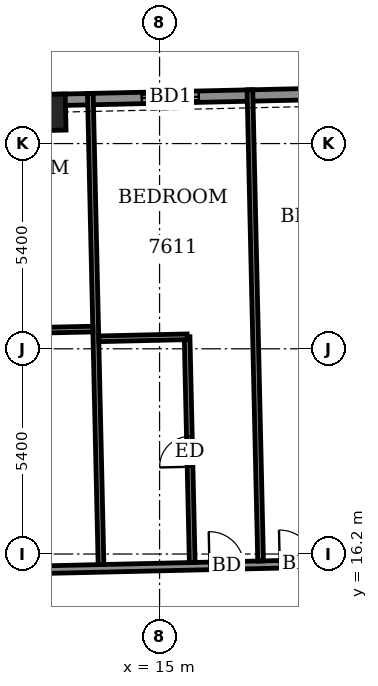
"""IFC4 building model, lengths in metres.
Left out: names, types, materials, properties, quantities, classifications, styles, units other than length and angle.
Written with IfcOpenShell. Run it as: python <this file> out.ifc"""

import sys

from ifc_helpers import new_model, si_unit, direction, frame, frame_2d, origin, origin_2d, place, context, subcontext, project, spatial, rectangle, extrude, element, fill, save


model = new_model("IFC4")
c1 = context("Model", 3, precision=1e-05, world=origin(), true_north=direction((0.0, 1.0)))
c2 = subcontext(c1, "Body", "Model", "MODEL_VIEW")
j1 = project(units=[si_unit("LENGTHUNIT", "METRE"), si_unit("PLANEANGLEUNIT", "RADIAN")], contexts=[c1])
p1 = place(None, origin())
s1 = spatial("IfcSite", under=j1, at=p1, CompositionType="ELEMENT")
p2 = place(p1, origin())
s2 = spatial("IfcBuilding", under=s1, at=p2, CompositionType="ELEMENT")
p3 = place(p2, frame((0.0, 0.0, 297.9)))
s3 = spatial("IfcBuildingStorey", under=s2, at=p3, CompositionType="ELEMENT", Elevation=297.9)
p4 = place(p3, frame((12.053, 27.819, -0.55), z_axis=(0.0, 0.0, 1.0), x_axis=(-0.9997425919, -0.02268810132, 0.0)))
e1 = element("IfcColumn", 1, at=p4, inside=s3, PredefinedType="COLUMN", context=c2, shape_type="SweptSolid", body=[
    extrude(rectangle(XDim=0.95, YDim=0.95, at=origin_2d()), origin(), (0.0, 0.0, 1.0), 3.6),
])
p5 = place(p3, frame((26.216, 28.465, 0.0), z_axis=(0.0, 0.0, 1.0), x_axis=(-0.999742843677, -0.022677004157, 0.0)))
e2 = element("IfcWall", 2, at=p5, inside=s3, PredefinedType="SOLIDWALL", context=c2, shape_type="SweptSolid", body=[
    extrude(rectangle(XDim=49.836, YDim=0.3, at=frame_2d((24.918, 0.0))), origin(), (0.0, 0.0, 1.0), 2.5),
])
p6 = place(p5, frame((1.763, 0.0, 0.0)))
e3 = element("IfcOpeningElement", 3, at=p6, cuts=e2, PredefinedType="OPENING", context=c2, shape_type="SweptSolid", body=[
    extrude(rectangle(XDim=1.5, YDim=2.4, at=frame_2d((0.75, 1.2))), frame((0.0, 0.16, 0.0), z_axis=(0.0, -1.0, 0.0), x_axis=(1.0, 0.0, 0.0)), (0.0, 0.0, 1.0), 0.32),
])
p7 = place(p5, frame((4.912, 0.0, 0.0)))
e4 = element("IfcOpeningElement", 4, at=p7, cuts=e2, PredefinedType="OPENING", context=c2, shape_type="SweptSolid", body=[
    extrude(rectangle(XDim=1.5, YDim=2.4, at=frame_2d((0.75, 1.2))), frame((0.0, 0.16, 0.0), z_axis=(0.0, -1.0, 0.0), x_axis=(1.0, 0.0, 0.0)), (0.0, 0.0, 1.0), 0.32),
])
p8 = place(p5, frame((10.186, 0.0, 0.0)))
e5 = element("IfcOpeningElement", 5, at=p8, cuts=e2, PredefinedType="OPENING", context=c2, shape_type="SweptSolid", body=[
    extrude(rectangle(XDim=1.5, YDim=2.4, at=frame_2d((0.75, 1.2))), frame((0.0, 0.16, 0.0), z_axis=(0.0, -1.0, 0.0), x_axis=(1.0, 0.0, 0.0)), (0.0, 0.0, 1.0), 0.32),
])
p9 = place(p5, frame((15.093, 0.0, 0.0)))
e6 = element("IfcOpeningElement", 6, at=p9, cuts=e2, PredefinedType="OPENING", context=c2, shape_type="SweptSolid", body=[
    extrude(rectangle(XDim=1.5, YDim=2.4, at=frame_2d((0.75, 1.2))), frame((0.0, 0.16, 0.0), z_axis=(0.0, -1.0, 0.0), x_axis=(1.0, 0.0, 0.0)), (0.0, 0.0, 1.0), 0.32),
])
p10 = place(p5, frame((18.449, 0.0, 0.0)))
e7 = element("IfcOpeningElement", 7, at=p10, cuts=e2, PredefinedType="OPENING", context=c2, shape_type="SweptSolid", body=[
    extrude(rectangle(XDim=1.5, YDim=2.4, at=frame_2d((0.75, 1.2))), frame((0.0, 0.16, 0.0), z_axis=(0.0, -1.0, 0.0), x_axis=(1.0, 0.0, 0.0)), (0.0, 0.0, 1.0), 0.32),
])
p11 = place(p5, frame((22.924, 0.0, 0.0)))
e8 = element("IfcOpeningElement", 8, at=p11, cuts=e2, PredefinedType="OPENING", context=c2, shape_type="SweptSolid", body=[
    extrude(rectangle(XDim=1.5, YDim=2.4, at=frame_2d((0.75, 1.2))), frame((0.0, 0.16, 0.0), z_axis=(0.0, -1.0, 0.0), x_axis=(1.0, 0.0, 0.0)), (0.0, 0.0, 1.0), 0.32),
])
p12 = place(p5, frame((26.28, 0.0, 0.0)))
e9 = element("IfcOpeningElement", 9, at=p12, cuts=e2, PredefinedType="OPENING", context=c2, shape_type="SweptSolid", body=[
    extrude(rectangle(XDim=1.5, YDim=2.4, at=frame_2d((0.75, 1.2))), frame((0.0, 0.16, 0.0), z_axis=(0.0, -1.0, 0.0), x_axis=(1.0, 0.0, 0.0)), (0.0, 0.0, 1.0), 0.32),
])
p13 = place(p5, frame((31.361, 0.0, 0.0)))
e10 = element("IfcOpeningElement", 10, at=p13, cuts=e2, PredefinedType="OPENING", context=c2, shape_type="SweptSolid", body=[
    extrude(rectangle(XDim=1.5, YDim=2.4, at=frame_2d((0.75, 1.2))), frame((0.0, 0.16, 0.0), z_axis=(0.0, -1.0, 0.0), x_axis=(1.0, 0.0, 0.0)), (0.0, 0.0, 1.0), 0.32),
])
p14 = place(p5, frame((36.437, 0.0, 0.0)))
e11 = element("IfcOpeningElement", 11, at=p14, cuts=e2, PredefinedType="OPENING", context=c2, shape_type="SweptSolid", body=[
    extrude(rectangle(XDim=1.5, YDim=2.4, at=frame_2d((0.75, 1.2))), frame((0.0, 0.16, 0.0), z_axis=(0.0, -1.0, 0.0), x_axis=(1.0, 0.0, 0.0)), (0.0, 0.0, 1.0), 0.32),
])
p15 = place(p5, frame((39.793, 0.0, 0.0)))
e12 = element("IfcOpeningElement", 12, at=p15, cuts=e2, PredefinedType="OPENING", context=c2, shape_type="SweptSolid", body=[
    extrude(rectangle(XDim=1.5, YDim=2.4, at=frame_2d((0.75, 1.2))), frame((0.0, 0.16, 0.0), z_axis=(0.0, -1.0, 0.0), x_axis=(1.0, 0.0, 0.0)), (0.0, 0.0, 1.0), 0.32),
])
p16 = place(p5, frame((44.267, 0.0, 0.0)))
e13 = element("IfcOpeningElement", 13, at=p16, cuts=e2, PredefinedType="OPENING", context=c2, shape_type="SweptSolid", body=[
    extrude(rectangle(XDim=1.5, YDim=2.4, at=frame_2d((0.75, 1.2))), frame((0.0, 0.16, 0.0), z_axis=(0.0, -1.0, 0.0), x_axis=(1.0, 0.0, 0.0)), (0.0, 0.0, 1.0), 0.32),
])
p17 = place(p5, frame((47.524, 0.0, 0.9)))
e14 = element("IfcOpeningElement", 14, at=p17, cuts=e2, PredefinedType="OPENING", context=c2, shape_type="SweptSolid", body=[
    extrude(rectangle(XDim=1.2, YDim=1.5, at=frame_2d((0.6, 0.75))), frame((0.0, 0.16, 0.0), z_axis=(0.0, -1.0, 0.0), x_axis=(1.0, 0.0, 0.0)), (0.0, 0.0, 1.0), 0.32),
])
p18 = place(p3, frame((-26.401, 14.918, 0.0), z_axis=(0.0, 0.0, 1.0), x_axis=(0.99974239733, 0.022696673341, 0.0)))
e15 = element("IfcWall", 15, at=p18, inside=s3, PredefinedType="PARTITIONING", context=c2, shape_type="SweptSolid", body=[
    extrude(rectangle(XDim=55.386, YDim=0.2, at=frame_2d((27.693, 0.0))), origin(), (0.0, 0.0, 1.0), 3.05),
])
p19 = place(p18, frame((53.718, 0.0, 0.0)))
e16 = element("IfcOpeningElement", 16, at=p19, cuts=e15, PredefinedType="OPENING", context=c2, shape_type="SweptSolid", body=[
    extrude(rectangle(XDim=1.0, YDim=2.1, at=frame_2d((0.5, 1.05))), frame((0.0, 0.11, 0.0), z_axis=(0.0, -1.0, 0.0), x_axis=(1.0, 0.0, 0.0)), (0.0, 0.0, 1.0), 0.22),
])
p20 = place(p18, frame((49.325, 0.0, 0.0)))
e17 = element("IfcOpeningElement", 17, at=p20, cuts=e15, PredefinedType="OPENING", context=c2, shape_type="SweptSolid", body=[
    extrude(rectangle(XDim=0.9, YDim=2.1, at=frame_2d((0.45, 1.05))), frame((0.0, 0.11, 0.0), z_axis=(0.0, -1.0, 0.0), x_axis=(1.0, 0.0, 0.0)), (0.0, 0.0, 1.0), 0.22),
])
p21 = place(p18, frame((44.575, 0.0, 0.0)))
e18 = element("IfcOpeningElement", 18, at=p21, cuts=e15, PredefinedType="OPENING", context=c2, shape_type="SweptSolid", body=[
    extrude(rectangle(XDim=0.9, YDim=2.1, at=frame_2d((0.45, 1.05))), frame((0.0, 0.11, 0.0), z_axis=(0.0, -1.0, 0.0), x_axis=(1.0, 0.0, 0.0)), (0.0, 0.0, 1.0), 0.22),
])
p22 = place(p18, frame((42.725, 0.0, 0.0)))
e19 = element("IfcOpeningElement", 19, at=p22, cuts=e15, PredefinedType="OPENING", context=c2, shape_type="SweptSolid", body=[
    extrude(rectangle(XDim=0.9, YDim=2.1, at=frame_2d((0.45, 1.05))), frame((0.0, 0.11, 0.0), z_axis=(0.0, -1.0, 0.0), x_axis=(1.0, 0.0, 0.0)), (0.0, 0.0, 1.0), 0.22),
])
p23 = place(p18, frame((36.1, 0.0, 0.0)))
e20 = element("IfcOpeningElement", 20, at=p23, cuts=e15, PredefinedType="OPENING", context=c2, shape_type="SweptSolid", body=[
    extrude(rectangle(XDim=0.9, YDim=2.1, at=frame_2d((0.45, 1.05))), frame((0.0, 0.11, 0.0), z_axis=(0.0, -1.0, 0.0), x_axis=(1.0, 0.0, 0.0)), (0.0, 0.0, 1.0), 0.22),
])
p24 = place(p18, frame((34.25, 0.0, 0.0)))
e21 = element("IfcOpeningElement", 21, at=p24, cuts=e15, PredefinedType="OPENING", context=c2, shape_type="SweptSolid", body=[
    extrude(rectangle(XDim=0.9, YDim=2.1, at=frame_2d((0.45, 1.05))), frame((0.0, 0.11, 0.0), z_axis=(0.0, -1.0, 0.0), x_axis=(1.0, 0.0, 0.0)), (0.0, 0.0, 1.0), 0.22),
])
p25 = place(p18, frame((27.6, 0.0, 0.0)))
e22 = element("IfcOpeningElement", 22, at=p25, cuts=e15, PredefinedType="OPENING", context=c2, shape_type="SweptSolid", body=[
    extrude(rectangle(XDim=0.9, YDim=2.1, at=frame_2d((0.45, 1.05))), frame((0.0, 0.11, 0.0), z_axis=(0.0, -1.0, 0.0), x_axis=(1.0, 0.0, 0.0)), (0.0, 0.0, 1.0), 0.22),
])
p26 = place(p18, frame((25.775, 0.0, 0.0)))
e23 = element("IfcOpeningElement", 23, at=p26, cuts=e15, PredefinedType="OPENING", context=c2, shape_type="SweptSolid", body=[
    extrude(rectangle(XDim=0.9, YDim=2.1, at=frame_2d((0.45, 1.05))), frame((0.0, 0.11, 0.0), z_axis=(0.0, -1.0, 0.0), x_axis=(1.0, 0.0, 0.0)), (0.0, 0.0, 1.0), 0.22),
])
p27 = place(p18, frame((19.15, 0.0, 0.0)))
e24 = element("IfcOpeningElement", 24, at=p27, cuts=e15, PredefinedType="OPENING", context=c2, shape_type="SweptSolid", body=[
    extrude(rectangle(XDim=0.9, YDim=2.1, at=frame_2d((0.45, 1.05))), frame((0.0, 0.11, 0.0), z_axis=(0.0, -1.0, 0.0), x_axis=(1.0, 0.0, 0.0)), (0.0, 0.0, 1.0), 0.22),
])
p28 = place(p18, frame((17.3, 0.0, 0.0)))
e25 = element("IfcOpeningElement", 25, at=p28, cuts=e15, PredefinedType="OPENING", context=c2, shape_type="SweptSolid", body=[
    extrude(rectangle(XDim=0.9, YDim=2.1, at=frame_2d((0.45, 1.05))), frame((0.0, 0.11, 0.0), z_axis=(0.0, -1.0, 0.0), x_axis=(1.0, 0.0, 0.0)), (0.0, 0.0, 1.0), 0.22),
])
p29 = place(p18, frame((10.65, 0.0, 0.0)))
e26 = element("IfcOpeningElement", 26, at=p29, cuts=e15, PredefinedType="OPENING", context=c2, shape_type="SweptSolid", body=[
    extrude(rectangle(XDim=0.9, YDim=2.1, at=frame_2d((0.45, 1.05))), frame((0.0, 0.11, 0.0), z_axis=(0.0, -1.0, 0.0), x_axis=(1.0, 0.0, 0.0)), (0.0, 0.0, 1.0), 0.22),
])
p30 = place(p18, frame((8.8, 0.0, 0.0)))
e27 = element("IfcOpeningElement", 27, at=p30, cuts=e15, PredefinedType="OPENING", context=c2, shape_type="SweptSolid", body=[
    extrude(rectangle(XDim=0.9, YDim=2.1, at=frame_2d((0.45, 1.05))), frame((0.0, 0.11, 0.0), z_axis=(0.0, -1.0, 0.0), x_axis=(1.0, 0.0, 0.0)), (0.0, 0.0, 1.0), 0.22),
])
p31 = place(p18, frame((1.864, 0.0, 0.0)))
e28 = element("IfcOpeningElement", 28, at=p31, cuts=e15, PredefinedType="OPENING", context=c2, shape_type="SweptSolid", body=[
    extrude(rectangle(XDim=1.0, YDim=2.1, at=frame_2d((0.5, 1.05))), frame((0.0, 0.11, 0.0), z_axis=(0.0, -1.0, 0.0), x_axis=(1.0, 0.0, 0.0)), (0.0, 0.0, 1.0), 0.22),
])
p32 = place(p3, frame((13.459, 15.923, 0.0), z_axis=(0.0, 0.0, 1.0), x_axis=(-0.022661475803, 0.999743195783, 0.0)))
e29 = element("IfcWall", 29, at=p32, inside=s3, PredefinedType="PARTITIONING", context=c2, shape_type="SweptSolid", body=[
    extrude(rectangle(XDim=12.4, YDim=0.15, at=frame_2d((6.2, 0.0))), origin(), (0.0, 0.0, 1.0), 2.5),
])
p33 = place(p3, frame((15.859, 15.977, 0.0), z_axis=(0.0, 0.0, 1.0), x_axis=(-0.022685930195, 0.999742641169, 0.0)))
e30 = element("IfcWall", 30, at=p33, inside=s3, PredefinedType="PARTITIONING", context=c2, shape_type="SweptSolid", body=[
    extrude(rectangle(XDim=5.94, YDim=0.15, at=frame_2d((2.97, 0.0))), origin(), (0.0, 0.0, 1.0), 3.05),
])
p34 = place(p33, frame((2.52, 0.0, 0.0)))
e31 = element("IfcOpeningElement", 31, at=p34, cuts=e30, PredefinedType="OPENING", context=c2, shape_type="SweptSolid", body=[
    extrude(rectangle(XDim=0.8, YDim=2.1, at=frame_2d((0.4, 1.05))), frame((0.0, 0.085, 0.0), z_axis=(0.0, -1.0, 0.0), x_axis=(1.0, 0.0, 0.0)), (0.0, 0.0, 1.0), 0.17),
])
p35 = place(p3, frame((17.658, 16.018, 0.0), z_axis=(0.0, 0.0, 1.0), x_axis=(-0.022661475803, 0.999743195783, 0.0)))
e32 = element("IfcWall", 32, at=p35, inside=s3, PredefinedType="PARTITIONING", context=c2, shape_type="SweptSolid", body=[
    extrude(rectangle(XDim=12.4, YDim=0.15, at=frame_2d((6.2, 0.0))), origin(), (0.0, 0.0, 1.0), 2.5),
])
for number, where, z_axis, x_axis in (
    (33, (13.401, 21.863, 0.0), (0.0, 0.0, 1.0), (1.0, 0.023, 0.0)),
    (34, (10.921, 22.067, 0.0), (0.0, 0.0, 1.0), (1.0, 0.022, 0.0)),
):
    element("IfcWall", number, at=place(p3, frame(where, z_axis=z_axis, x_axis=x_axis)), inside=s3, PredefinedType="PARTITIONING", context=c2, shape_type="SweptSolid", body=[
        extrude(rectangle(XDim=2.326, YDim=0.15, at=frame_2d((1.163, 0.0))), origin(), (0.0, 0.0, 1.0), 3.05),
    ])
p36 = place(p8, origin())
e35 = element("IfcDoor", 35, at=p36, inside=s3, OperationType="SLIDING_TO_LEFT", PredefinedType="DOOR", context=c2, shape_type="SweptSolid", body=[
    extrude(rectangle(XDim=1.5, YDim=2.4, at=frame_2d((0.75, 1.2))), frame((0.0, 0.025, 0.0), z_axis=(0.0, -1.0, 0.0), x_axis=(1.0, 0.0, 0.0)), (0.0, 0.0, 1.0), 0.05),
])
fill(e5, e35)
p37 = place(p21, origin())
e36 = element("IfcDoor", 36, at=p37, inside=s3, OperationType="SINGLE_SWING_RIGHT", PredefinedType="DOOR", context=c2, shape_type="SweptSolid", body=[
    extrude(rectangle(XDim=0.9, YDim=2.1, at=frame_2d((0.45, 1.05))), frame((0.0, 0.025, 0.0), z_axis=(0.0, -1.0, 0.0), x_axis=(1.0, 0.0, 0.0)), (0.0, 0.0, 1.0), 0.05),
])
fill(e18, e36)
p38 = place(p22, origin())
e37 = element("IfcDoor", 37, at=p38, inside=s3, OperationType="SINGLE_SWING_LEFT", PredefinedType="DOOR", context=c2, shape_type="SweptSolid", body=[
    extrude(rectangle(XDim=0.9, YDim=2.1, at=frame_2d((0.45, 1.05))), frame((0.0, 0.025, 0.0), z_axis=(0.0, -1.0, 0.0), x_axis=(1.0, 0.0, 0.0)), (0.0, 0.0, 1.0), 0.05),
])
fill(e19, e37)
p39 = place(p34, origin())
e38 = element("IfcDoor", 38, at=p39, inside=s3, OperationType="SINGLE_SWING_LEFT", PredefinedType="DOOR", context=c2, shape_type="SweptSolid", body=[
    extrude(rectangle(XDim=0.8, YDim=2.1, at=frame_2d((0.4, 1.05))), frame((0.0, 0.025, 0.0), z_axis=(0.0, -1.0, 0.0), x_axis=(1.0, 0.0, 0.0)), (0.0, 0.0, 1.0), 0.05),
])
fill(e31, e38)
save(model, sys.argv[1])
